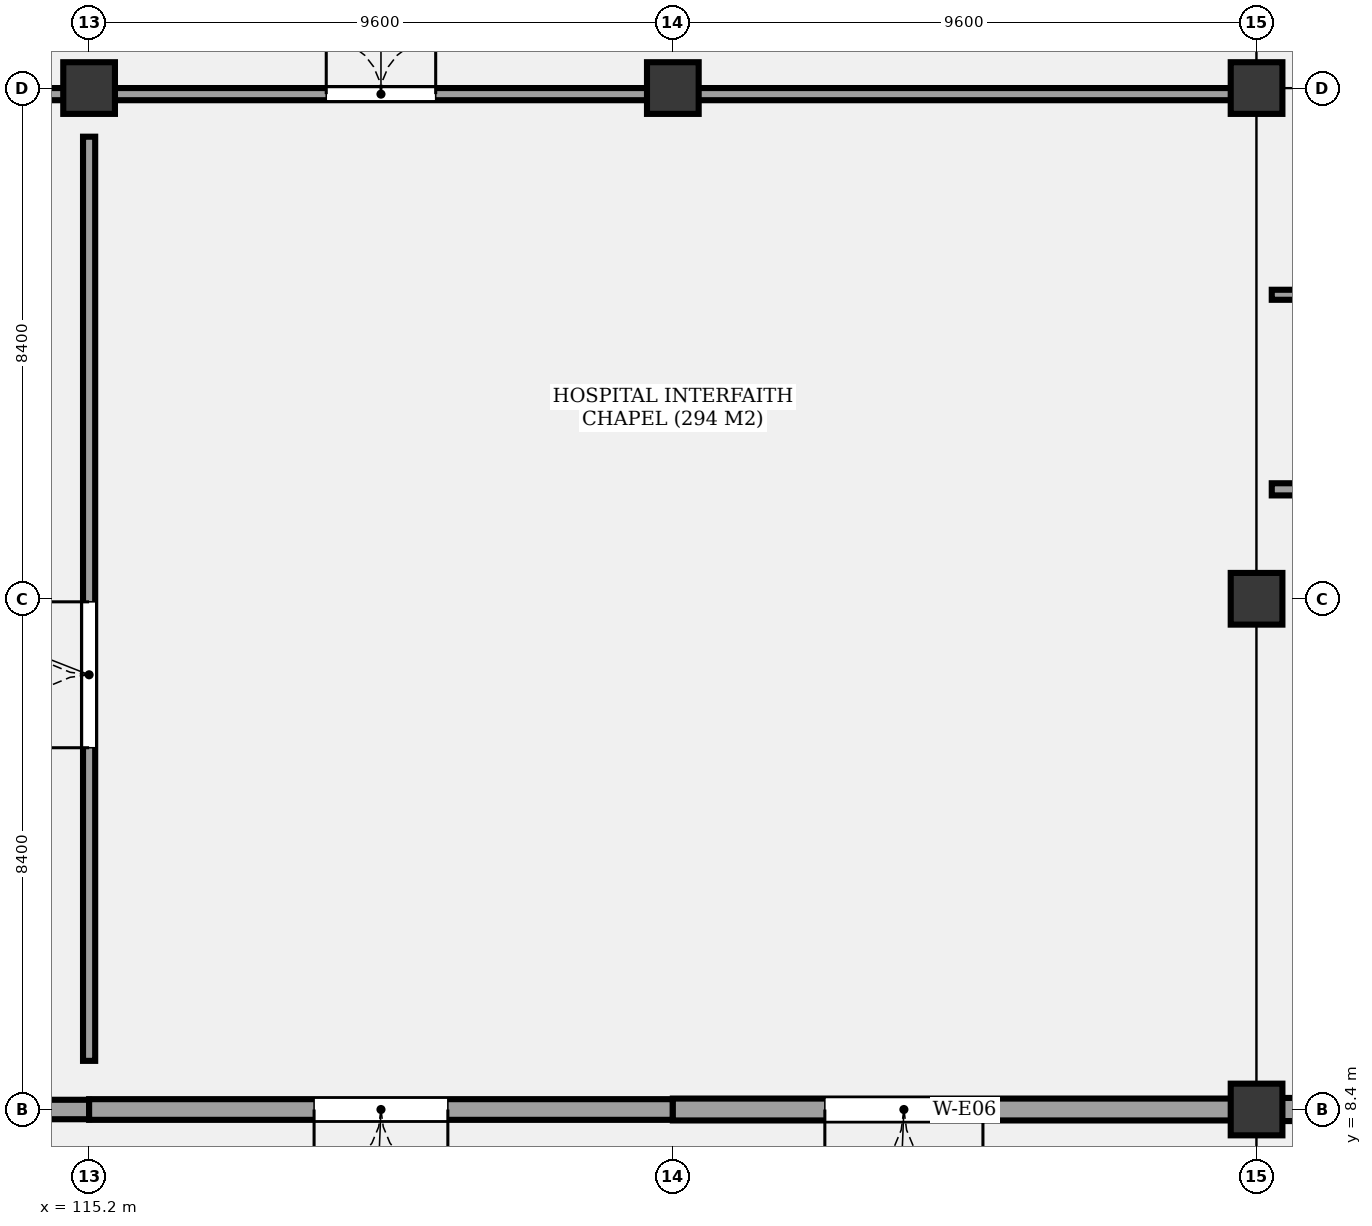
"""IFC4 building model, lengths in metres.
Left out: names, types, materials, properties, quantities, classifications, styles, units other than length and angle.
Written with IfcOpenShell. Run it as: python <this file> out.ifc"""

import sys

from ifc_helpers import new_model, si_unit, direction, frame, frame_2d, origin, origin_2d, place, context, subcontext, project, spatial, rectangle, extrude, element, fill, save


model = new_model("IFC4")
c1 = context("Model", 3, precision=1e-05, world=origin(), true_north=direction((0.0, 1.0)))
c2 = subcontext(c1, "Body", "Model", "MODEL_VIEW")
j1 = project(units=[si_unit("LENGTHUNIT", "METRE"), si_unit("PLANEANGLEUNIT", "RADIAN")], contexts=[c1])
p1 = place(None, origin())
s1 = spatial("IfcSite", under=j1, at=p1, CompositionType="ELEMENT")
p2 = place(p1, origin())
s2 = spatial("IfcBuilding", under=s1, at=p2, CompositionType="ELEMENT")
p3 = place(p2, origin())
s3 = spatial("IfcBuildingStorey", under=s2, at=p3, CompositionType="ELEMENT", Elevation=0.0)
for number, where, z_axis, x_axis in (
    (1, (115.2, 25.2, -0.35), (0.0, 0.0, 1.0), (1.0, 0.0, 0.0)),
    (2, (124.8, 25.2, -0.35), (0.0, 0.0, 1.0), (1.0, 0.0, 0.0)),
    (3, (134.4, 8.4, -0.35), (0.0, 0.0, 1.0), (1.0, 0.0, 0.0)),
    (4, (134.4, 16.8, -0.35), (0.0, 0.0, 1.0), (1.0, 0.0, 0.0)),
    (5, (134.4, 25.2, -0.35), (0.0, 0.0, 1.0), (1.0, 0.0, 0.0)),
):
    element("IfcColumn", number, at=place(p3, frame(where, z_axis=z_axis, x_axis=x_axis)), inside=s3, PredefinedType="COLUMN", context=c2, shape_type="SweptSolid", body=[
        extrude(rectangle(XDim=0.85, YDim=0.85, at=origin_2d()), origin(), (0.0, 0.0, 1.0), 5.45),
    ])
p4 = place(p3, frame((115.2, 8.4, 0.0), z_axis=(0.0, 0.0, 1.0), x_axis=(-1.0, 0.0, 0.0)))
e6 = element("IfcWall", 6, at=p4, inside=s3, PredefinedType="SOLIDWALL", context=c2, shape_type="SweptSolid", body=[
    extrude(rectangle(XDim=9.6, YDim=0.32, at=frame_2d((4.8, 0.0))), origin(), (0.0, 0.0, 1.0), 4.24),
])
p5 = place(p4, frame((3.5, 0.0, 0.0)))
e7 = element("IfcOpeningElement", 7, at=p5, cuts=e6, PredefinedType="OPENING", context=c2, shape_type="SweptSolid", body=[
    extrude(rectangle(XDim=2.6, YDim=2.6, at=frame_2d((1.3, 1.3))), frame((0.0, 0.17, 0.0), z_axis=(0.0, -1.0, 0.0), x_axis=(1.0, 0.0, 0.0)), (0.0, 0.0, 1.0), 0.34),
])
p6 = place(p3, frame((124.8, 8.4, 0.0), z_axis=(0.0, 0.0, 1.0), x_axis=(-1.0, 0.0, 0.0)))
e8 = element("IfcWall", 8, at=p6, inside=s3, PredefinedType="SOLIDWALL", context=c2, shape_type="SweptSolid", body=[
    extrude(rectangle(XDim=9.6, YDim=0.34, at=frame_2d((4.8, 0.0))), origin(), (0.0, 0.0, 1.0), 4.24),
])
p7 = place(p6, frame((3.7, 0.0, 0.0)))
e9 = element("IfcOpeningElement", 9, at=p7, cuts=e8, PredefinedType="OPENING", context=c2, shape_type="SweptSolid", body=[
    extrude(rectangle(XDim=2.2, YDim=2.5, at=frame_2d((1.1, 1.25))), frame((0.0, 0.18, 0.0), z_axis=(0.0, -1.0, 0.0), x_axis=(1.0, 0.0, 0.0)), (0.0, 0.0, 1.0), 0.36),
])
p8 = place(p3, frame((134.4, 8.4, 0.0), z_axis=(0.0, 0.0, 1.0), x_axis=(-1.0, 0.0, 0.0)))
e10 = element("IfcWall", 10, at=p8, inside=s3, PredefinedType="SOLIDWALL", context=c2, shape_type="SweptSolid", body=[
    extrude(rectangle(XDim=9.6, YDim=0.36, at=frame_2d((4.8, 0.0))), origin(), (0.0, 0.0, 1.0), 4.24),
])
p9 = place(p8, frame((4.5, 0.0, 0.0)))
e11 = element("IfcOpeningElement", 11, at=p9, cuts=e10, PredefinedType="OPENING", context=c2, shape_type="SweptSolid", body=[
    extrude(rectangle(XDim=2.6, YDim=2.6, at=frame_2d((1.3, 1.3))), frame((0.0, 0.19, 0.0), z_axis=(0.0, -1.0, 0.0), x_axis=(1.0, 0.0, 0.0)), (0.0, 0.0, 1.0), 0.38),
])
p10 = place(p3, frame((144.0, 8.4, 0.0), z_axis=(0.0, 0.0, 1.0), x_axis=(-1.0, 0.0, 0.0)))
e12 = element("IfcWall", 12, at=p10, inside=s3, PredefinedType="SOLIDWALL", context=c2, shape_type="SweptSolid", body=[
    extrude(rectangle(XDim=9.6, YDim=0.38, at=frame_2d((4.8, 0.0))), origin(), (0.0, 0.0, 1.0), 4.24),
])
p11 = place(p10, frame((3.7, 0.0, 0.0)))
e13 = element("IfcOpeningElement", 13, at=p11, cuts=e12, PredefinedType="OPENING", context=c2, shape_type="SweptSolid", body=[
    extrude(rectangle(XDim=2.2, YDim=2.5, at=frame_2d((1.1, 1.25))), frame((0.0, 0.2, 0.0), z_axis=(0.0, -1.0, 0.0), x_axis=(1.0, 0.0, 0.0)), (0.0, 0.0, 1.0), 0.4),
])
p12 = place(p3, frame((67.6, 25.1, 0.0), z_axis=(0.0, 0.0, 1.0), x_axis=(1.0, 0.0, 0.0)))
e14 = element("IfcWall", 14, at=p12, inside=s3, PredefinedType="PARTITIONING", context=c2, shape_type="SweptSolid", body=[
    extrude(rectangle(XDim=66.4, YDim=0.2, at=frame_2d((33.2, 0.0))), origin(), (0.0, 0.0, 1.0), 3.98),
])
p13 = place(p12, frame((12.8, 0.0, 0.0)))
e15 = element("IfcOpeningElement", 15, at=p13, cuts=e14, PredefinedType="OPENING", context=c2, shape_type="SweptSolid", body=[
    extrude(rectangle(XDim=2.4, YDim=2.4, at=frame_2d((1.2, 1.2))), frame((0.0, 0.11, 0.0), z_axis=(0.0, -1.0, 0.0), x_axis=(1.0, 0.0, 0.0)), (0.0, 0.0, 1.0), 0.22),
])
p14 = place(p12, frame((32.65, 0.0, 0.0)))
e16 = element("IfcOpeningElement", 16, at=p14, cuts=e14, PredefinedType="OPENING", context=c2, shape_type="SweptSolid", body=[
    extrude(rectangle(XDim=1.1, YDim=2.1, at=frame_2d((0.55, 1.05))), frame((0.0, 0.11, 0.0), z_axis=(0.0, -1.0, 0.0), x_axis=(1.0, 0.0, 0.0)), (0.0, 0.0, 1.0), 0.22),
])
p15 = place(p12, frame((42.25, 0.0, 0.0)))
e17 = element("IfcOpeningElement", 17, at=p15, cuts=e14, PredefinedType="OPENING", context=c2, shape_type="SweptSolid", body=[
    extrude(rectangle(XDim=1.1, YDim=2.1, at=frame_2d((0.55, 1.05))), frame((0.0, 0.11, 0.0), z_axis=(0.0, -1.0, 0.0), x_axis=(1.0, 0.0, 0.0)), (0.0, 0.0, 1.0), 0.22),
])
p16 = place(p12, frame((51.5, 0.0, 0.0)))
e18 = element("IfcOpeningElement", 18, at=p16, cuts=e14, PredefinedType="OPENING", context=c2, shape_type="SweptSolid", body=[
    extrude(rectangle(XDim=1.8, YDim=2.2, at=frame_2d((0.9, 1.1))), frame((0.0, 0.11, 0.0), z_axis=(0.0, -1.0, 0.0), x_axis=(1.0, 0.0, 0.0)), (0.0, 0.0, 1.0), 0.22),
])
p17 = place(p3, frame((115.2, 9.2, 0.0), z_axis=(0.0, 0.0, 1.0), x_axis=(0.0, 1.0, 0.0)))
e19 = element("IfcWall", 19, at=p17, inside=s3, PredefinedType="PARTITIONING", context=c2, shape_type="SweptSolid", body=[
    extrude(rectangle(XDim=15.2, YDim=0.2, at=frame_2d((7.6, 0.0))), origin(), (0.0, 0.0, 1.0), 3.98),
])
p18 = place(p17, frame((5.15, 0.0, 0.0)))
e20 = element("IfcOpeningElement", 20, at=p18, cuts=e19, PredefinedType="OPENING", context=c2, shape_type="SweptSolid", body=[
    extrude(rectangle(XDim=2.4, YDim=2.4, at=frame_2d((1.2, 1.2))), frame((0.0, 0.11, 0.0), z_axis=(0.0, -1.0, 0.0), x_axis=(1.0, 0.0, 0.0)), (0.0, 0.0, 1.0), 0.22),
])
p19 = place(p3, frame((134.65, 18.6, 0.0), z_axis=(0.0, 0.0, 1.0), x_axis=(1.0, 0.0, 0.0)))
e21 = element("IfcWall", 21, at=p19, inside=s3, PredefinedType="PARTITIONING", context=c2, shape_type="SweptSolid", body=[
    extrude(rectangle(XDim=8.643, YDim=0.2, at=frame_2d((4.322, 0.0))), origin(), (0.0, 0.0, 1.0), 3.98),
])
p20 = place(p19, frame((3.75, 0.0, 0.0)))
e22 = element("IfcOpeningElement", 22, at=p20, cuts=e21, PredefinedType="OPENING", context=c2, shape_type="SweptSolid", body=[
    extrude(rectangle(XDim=1.6, YDim=2.2, at=frame_2d((0.8, 1.1))), frame((0.0, 0.11, 0.0), z_axis=(0.0, -1.0, 0.0), x_axis=(1.0, 0.0, 0.0)), (0.0, 0.0, 1.0), 0.22),
])
p21 = place(p3, frame((134.65, 21.8, 0.0), z_axis=(0.0, 0.0, 1.0), x_axis=(1.0, 0.0, 0.0)))
e23 = element("IfcWall", 23, at=p21, inside=s3, PredefinedType="PARTITIONING", context=c2, shape_type="SweptSolid", body=[
    extrude(rectangle(XDim=8.643, YDim=0.165, at=frame_2d((4.322, 0.0))), origin(), (0.0, 0.0, 1.0), 3.98),
])
p22 = place(p21, frame((4.75, 0.0, 0.0)))
e24 = element("IfcOpeningElement", 24, at=p22, cuts=e23, PredefinedType="OPENING", context=c2, shape_type="SweptSolid", body=[
    extrude(rectangle(XDim=1.05, YDim=2.1, at=frame_2d((0.525, 1.05))), frame((0.0, 0.093, 0.0), z_axis=(0.0, -1.0, 0.0), x_axis=(1.0, 0.0, 0.0)), (0.0, 0.0, 1.0), 0.185),
])
p23 = place(p7, origin())
e25 = element("IfcDoor", 25, at=p23, inside=s3, OperationType="DOUBLE_DOOR_SINGLE_SWING", PredefinedType="DOOR", context=c2, shape_type="SweptSolid", body=[
    extrude(rectangle(XDim=2.2, YDim=2.5, at=frame_2d((1.1, 1.25))), frame((0.0, 0.025, 0.0), z_axis=(0.0, -1.0, 0.0), x_axis=(1.0, 0.0, 0.0)), (0.0, 0.0, 1.0), 0.05),
])
fill(e9, e25)
p24 = place(p9, origin())
e26 = element("IfcDoor", 26, at=p24, inside=s3, OperationType="DOUBLE_DOOR_SINGLE_SWING", PredefinedType="DOOR", context=c2, shape_type="SweptSolid", body=[
    extrude(rectangle(XDim=2.6, YDim=2.6, at=frame_2d((1.3, 1.3))), frame((0.0, 0.025, 0.0), z_axis=(0.0, -1.0, 0.0), x_axis=(1.0, 0.0, 0.0)), (0.0, 0.0, 1.0), 0.05),
])
fill(e11, e26)
p25 = place(p16, origin())
e27 = element("IfcDoor", 27, at=p25, inside=s3, OperationType="DOUBLE_DOOR_SINGLE_SWING", PredefinedType="DOOR", context=c2, shape_type="SweptSolid", body=[
    extrude(rectangle(XDim=1.8, YDim=2.2, at=frame_2d((0.9, 1.1))), frame((0.0, 0.025, 0.0), z_axis=(0.0, -1.0, 0.0), x_axis=(1.0, 0.0, 0.0)), (0.0, 0.0, 1.0), 0.05),
])
fill(e18, e27)
p26 = place(p18, origin())
e28 = element("IfcDoor", 28, at=p26, inside=s3, OperationType="DOUBLE_DOOR_SINGLE_SWING", PredefinedType="DOOR", context=c2, shape_type="SweptSolid", body=[
    extrude(rectangle(XDim=2.4, YDim=2.4, at=frame_2d((1.2, 1.2))), frame((0.0, 0.025, 0.0), z_axis=(0.0, -1.0, 0.0), x_axis=(1.0, 0.0, 0.0)), (0.0, 0.0, 1.0), 0.05),
])
fill(e20, e28)
save(model, sys.argv[1])
